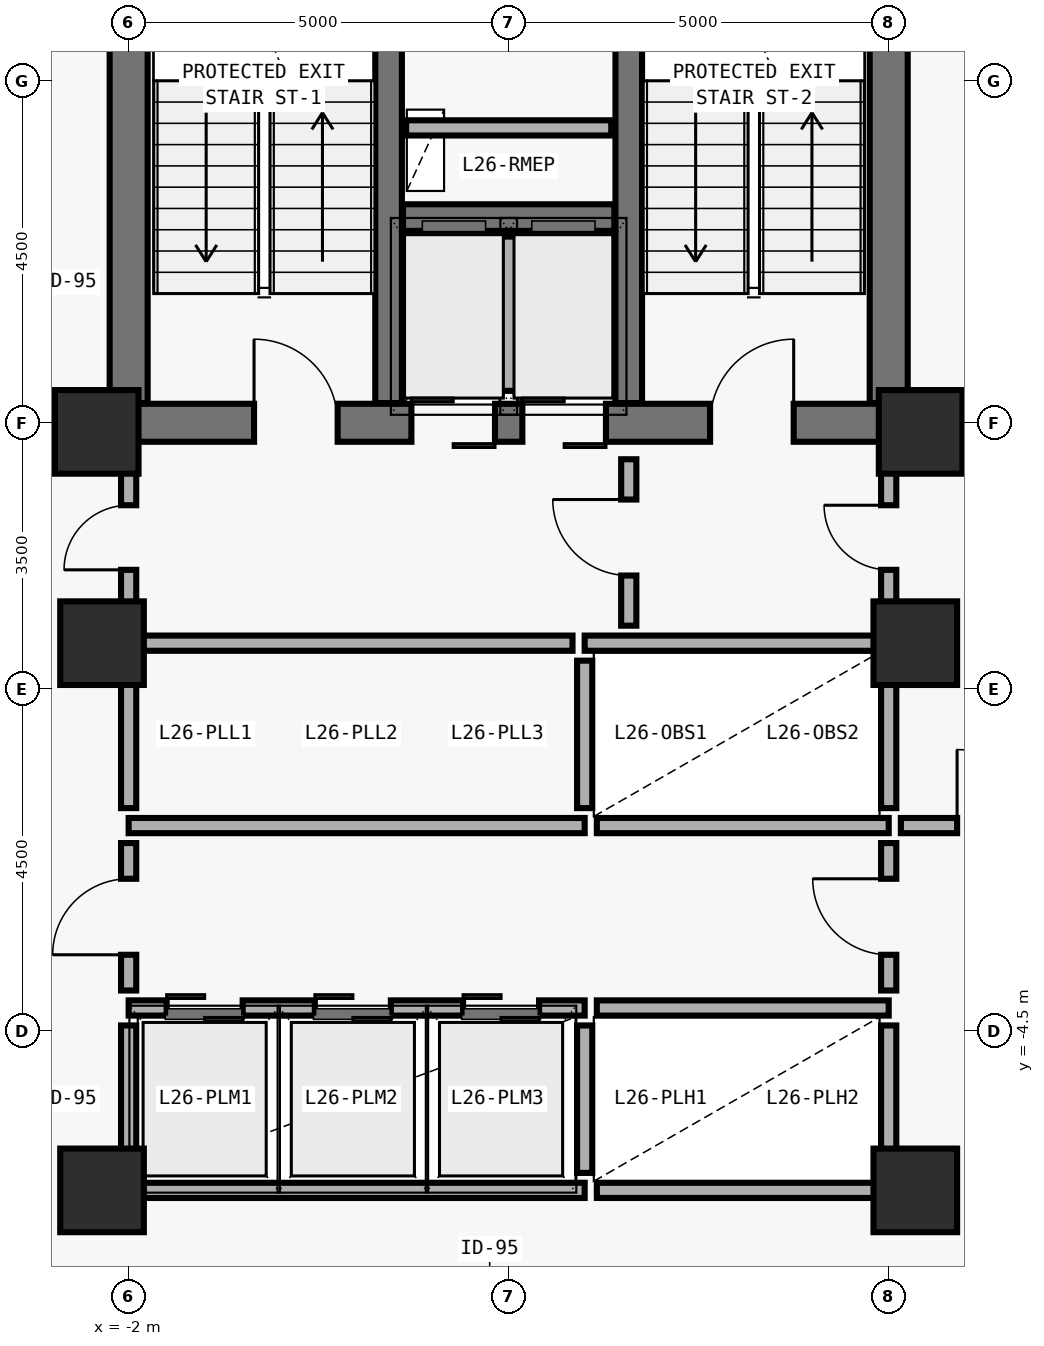
"""IFC4 building model, lengths in metres.
Left out: names, types, materials, properties, quantities, classifications, styles, units other than length and angle.
Written with IfcOpenShell. Run it as: python <this file> out.ifc"""

import sys

from ifc_helpers import new_model, si_unit, direction, frame, frame_2d, origin, origin_2d, place, context, subcontext, project, spatial, rectangle, extrude, element, fill, save


model = new_model("IFC4")
c1 = context("Model", 3, precision=1e-05, world=origin(), true_north=direction((0.0, 1.0)))
c2 = subcontext(c1, "Body", "Model", "MODEL_VIEW")
j1 = project(units=[si_unit("LENGTHUNIT", "METRE"), si_unit("PLANEANGLEUNIT", "RADIAN")], contexts=[c1])
p1 = place(None, origin())
s1 = spatial("IfcSite", under=j1, at=p1, CompositionType="ELEMENT")
p2 = place(p1, origin())
s2 = spatial("IfcBuilding", under=s1, at=p2, CompositionType="ELEMENT")
p3 = place(p2, frame((0.0, 0.0, 107.1)))
s3 = spatial("IfcBuildingStorey", under=s2, at=p3, CompositionType="ELEMENT", Elevation=107.1)
p4 = place(p3, frame((-2.0, 3.5, 0.0), z_axis=(0.0, 0.0, 1.0), x_axis=(1.0, 0.0, 0.0)))
e1 = element("IfcWall", 1, at=p4, inside=s3, PredefinedType="SHEAR", context=c2, shape_type="SweptSolid", body=[
    extrude(rectangle(XDim=10.0, YDim=0.5, at=frame_2d((5.0, 0.0))), origin(), (0.0, 0.0, 1.0), 3.892),
])
p5 = place(p4, frame((1.65, 0.0, 0.0)))
e2 = element("IfcOpeningElement", 2, at=p5, cuts=e1, PredefinedType="OPENING", context=c2, shape_type="SweptSolid", body=[
    extrude(rectangle(XDim=1.1, YDim=2.15, at=frame_2d((0.55, 1.075))), frame((0.0, 0.26, 0.0), z_axis=(0.0, -1.0, 0.0), x_axis=(1.0, 0.0, 0.0)), (0.0, 0.0, 1.0), 0.52),
])
p6 = place(p4, frame((7.65, 0.0, 0.0)))
e3 = element("IfcOpeningElement", 3, at=p6, cuts=e1, PredefinedType="OPENING", context=c2, shape_type="SweptSolid", body=[
    extrude(rectangle(XDim=1.1, YDim=2.15, at=frame_2d((0.55, 1.075))), frame((0.0, 0.26, 0.0), z_axis=(0.0, -1.0, 0.0), x_axis=(1.0, 0.0, 0.0)), (0.0, 0.0, 1.0), 0.52),
])
p7 = place(p4, frame((3.72, 0.0, 0.0)))
e4 = element("IfcOpeningElement", 4, at=p7, cuts=e1, PredefinedType="OPENING", context=c2, shape_type="SweptSolid", body=[
    extrude(rectangle(XDim=1.1, YDim=2.2, at=frame_2d((0.55, 1.1))), frame((0.0, 0.26, 0.0), z_axis=(0.0, -1.0, 0.0), x_axis=(1.0, 0.0, 0.0)), (0.0, 0.0, 1.0), 0.52),
])
p8 = place(p4, frame((5.18, 0.0, 0.0)))
e5 = element("IfcOpeningElement", 5, at=p8, cuts=e1, PredefinedType="OPENING", context=c2, shape_type="SweptSolid", body=[
    extrude(rectangle(XDim=1.1, YDim=2.2, at=frame_2d((0.55, 1.1))), frame((0.0, 0.26, 0.0), z_axis=(0.0, -1.0, 0.0), x_axis=(1.0, 0.0, 0.0)), (0.0, 0.0, 1.0), 0.52),
])
for number, where, z_axis, x_axis in (
    (6, (-2.0, 3.76, 0.0), (0.0, 0.0, 1.0), (0.0, 1.0, 0.0)),
    (7, (8.0, 3.76, 0.0), (0.0, 0.0, 1.0), (0.0, 1.0, 0.0)),
):
    element("IfcWall", number, at=place(p3, frame(where, z_axis=z_axis, x_axis=x_axis)), inside=s3, PredefinedType="SHEAR", context=c2, shape_type="SweptSolid", body=[
        extrude(rectangle(XDim=8.48, YDim=0.5, at=frame_2d((4.24, 0.0))), origin(), (0.0, 0.0, 1.0), 3.892),
    ])
for number, where, z_axis, x_axis in (
    (8, (1.42, 3.76, 0.0), (0.0, 0.0, 1.0), (0.0, 1.0, 0.0)),
    (9, (4.58, 3.76, 0.0), (0.0, 0.0, 1.0), (0.0, 1.0, 0.0)),
):
    element("IfcWall", number, at=place(p3, frame(where, z_axis=z_axis, x_axis=x_axis)), inside=s3, PredefinedType="SHEAR", context=c2, shape_type="SweptSolid", body=[
        extrude(rectangle(XDim=8.48, YDim=0.35, at=frame_2d((4.24, 0.0))), origin(), (0.0, 0.0, 1.0), 3.892),
    ])
p9 = place(p3, frame((1.61, 6.2, 0.0), z_axis=(0.0, 0.0, 1.0), x_axis=(1.0, 0.0, 0.0)))
e10 = element("IfcWall", 10, at=p9, inside=s3, PredefinedType="SHEAR", context=c2, shape_type="SweptSolid", body=[
    extrude(rectangle(XDim=2.78, YDim=0.35, at=frame_2d((1.39, 0.0))), origin(), (0.0, 0.0, 1.0), 3.892),
])
for number, where, z_axis, x_axis in (
    (11, (-2.42, 3.38, 0.0), (0.0, 0.0, 1.0), (1.0, 0.0, 0.0)),
    (12, (8.42, 3.38, 0.0), (0.0, 0.0, 1.0), (1.0, 0.0, 0.0)),
    (13, (-2.35, 0.6, 0.0), (0.0, 0.0, 1.0), (1.0, 0.0, 0.0)),
    (14, (8.35, 0.6, 0.0), (0.0, 0.0, 1.0), (1.0, 0.0, 0.0)),
    (15, (-2.35, -6.6, 0.0), (0.0, 0.0, 1.0), (1.0, 0.0, 0.0)),
    (16, (8.35, -6.6, 0.0), (0.0, 0.0, 1.0), (1.0, 0.0, 0.0)),
):
    element("IfcColumn", number, at=place(p3, frame(where, z_axis=z_axis, x_axis=x_axis)), inside=s3, PredefinedType="COLUMN", context=c2, shape_type="SweptSolid", body=[
        extrude(rectangle(XDim=1.1, YDim=1.1, at=origin_2d()), origin(), (0.0, 0.0, 1.0), 3.875),
    ])
p10 = place(p3, frame((3.0, 3.92, 0.0), z_axis=(0.0, 0.0, 1.0), x_axis=(0.0, 1.0, 0.0)))
e17 = element("IfcWall", 17, at=p10, inside=s3, PredefinedType="SOLIDWALL", context=c2, shape_type="SweptSolid", body=[
    extrude(rectangle(XDim=2.03, YDim=0.2, at=frame_2d((1.015, 0.0))), origin(), (0.0, 0.0, 1.0), 3.64),
])
p11 = place(p3, frame((1.65, 7.38, 0.0), z_axis=(0.0, 0.0, 1.0), x_axis=(1.0, 0.0, 0.0)))
e18 = element("IfcWall", 18, at=p11, inside=s3, PredefinedType="SOLIDWALL", context=c2, shape_type="SweptSolid", body=[
    extrude(rectangle(XDim=2.7, YDim=0.2, at=frame_2d((1.35, 0.0))), origin(), (0.0, 0.0, 1.0), 3.64),
])
p12 = place(p3, frame((4.0, 0.6, 0.0), z_axis=(0.0, 0.0, 1.0), x_axis=(1.0, 0.0, 0.0)))
e19 = element("IfcWall", 19, at=p12, inside=s3, PredefinedType="SOLIDWALL", context=c2, shape_type="SweptSolid", body=[
    extrude(rectangle(XDim=3.88, YDim=0.2, at=frame_2d((1.94, 0.0))), origin(), (0.0, 0.0, 1.0), 3.172),
])
p13 = place(p3, frame((-2.0, -1.8, 0.0), z_axis=(0.0, 0.0, 1.0), x_axis=(1.0, 0.0, 0.0)))
e20 = element("IfcWall", 20, at=p13, inside=s3, PredefinedType="SOLIDWALL", context=c2, shape_type="SweptSolid", body=[
    extrude(rectangle(XDim=6.0, YDim=0.2, at=frame_2d((3.0, 0.0))), origin(), (0.0, 0.0, 1.0), 3.64),
])
p14 = place(p3, frame((-2.0, -1.57, 0.0), z_axis=(0.0, 0.0, 1.0), x_axis=(0.0, 1.0, 0.0)))
e21 = element("IfcWall", 21, at=p14, inside=s3, PredefinedType="SOLIDWALL", context=c2, shape_type="SweptSolid", body=[
    extrude(rectangle(XDim=2.05, YDim=0.2, at=frame_2d((1.025, 0.0))), origin(), (0.0, 0.0, 1.0), 3.022),
])
p15 = place(p3, frame((4.16, -1.8, 0.0), z_axis=(0.0, 0.0, 1.0), x_axis=(1.0, 0.0, 0.0)))
e22 = element("IfcWall", 22, at=p15, inside=s3, PredefinedType="SOLIDWALL", context=c2, shape_type="SweptSolid", body=[
    extrude(rectangle(XDim=3.84, YDim=0.2, at=frame_2d((1.92, 0.0))), origin(), (0.0, 0.0, 1.0), 3.64),
])
p16 = place(p3, frame((4.0, -1.57, 0.0), z_axis=(0.0, 0.0, 1.0), x_axis=(0.0, 1.0, 0.0)))
e23 = element("IfcWall", 23, at=p16, inside=s3, PredefinedType="SOLIDWALL", context=c2, shape_type="SweptSolid", body=[
    extrude(rectangle(XDim=1.94, YDim=0.2, at=frame_2d((0.97, 0.0))), origin(), (0.0, 0.0, 1.0), 3.64),
])
p17 = place(p3, frame((8.0, -1.57, 0.0), z_axis=(0.0, 0.0, 1.0), x_axis=(0.0, 1.0, 0.0)))
e24 = element("IfcWall", 24, at=p17, inside=s3, PredefinedType="SOLIDWALL", context=c2, shape_type="SweptSolid", body=[
    extrude(rectangle(XDim=2.05, YDim=0.2, at=frame_2d((1.025, 0.0))), origin(), (0.0, 0.0, 1.0), 3.072),
])
p18 = place(p3, frame((-2.0, -4.2, 0.0), z_axis=(0.0, 0.0, 1.0), x_axis=(1.0, 0.0, 0.0)))
e25 = element("IfcWall", 25, at=p18, inside=s3, PredefinedType="SOLIDWALL", context=c2, shape_type="SweptSolid", body=[
    extrude(rectangle(XDim=6.0, YDim=0.2, at=frame_2d((3.0, 0.0))), origin(), (0.0, 0.0, 1.0), 3.64),
])
p19 = place(p18, frame((0.5, 0.0, 0.0)))
e26 = element("IfcOpeningElement", 26, at=p19, cuts=e25, PredefinedType="OPENING", context=c2, shape_type="SweptSolid", body=[
    extrude(rectangle(XDim=1.0, YDim=2.2, at=frame_2d((0.5, 1.1))), frame((0.0, 0.11, 0.0), z_axis=(0.0, -1.0, 0.0), x_axis=(1.0, 0.0, 0.0)), (0.0, 0.0, 1.0), 0.22),
])
p20 = place(p18, frame((2.45, 0.0, 0.0)))
e27 = element("IfcOpeningElement", 27, at=p20, cuts=e25, PredefinedType="OPENING", context=c2, shape_type="SweptSolid", body=[
    extrude(rectangle(XDim=1.0, YDim=2.2, at=frame_2d((0.5, 1.1))), frame((0.0, 0.11, 0.0), z_axis=(0.0, -1.0, 0.0), x_axis=(1.0, 0.0, 0.0)), (0.0, 0.0, 1.0), 0.22),
])
p21 = place(p18, frame((4.4, 0.0, 0.0)))
e28 = element("IfcOpeningElement", 28, at=p21, cuts=e25, PredefinedType="OPENING", context=c2, shape_type="SweptSolid", body=[
    extrude(rectangle(XDim=1.0, YDim=2.2, at=frame_2d((0.5, 1.1))), frame((0.0, 0.11, 0.0), z_axis=(0.0, -1.0, 0.0), x_axis=(1.0, 0.0, 0.0)), (0.0, 0.0, 1.0), 0.22),
])
p22 = place(p3, frame((-2.0, -6.6, 0.0), z_axis=(0.0, 0.0, 1.0), x_axis=(1.0, 0.0, 0.0)))
e29 = element("IfcWall", 29, at=p22, inside=s3, PredefinedType="SOLIDWALL", context=c2, shape_type="SweptSolid", body=[
    extrude(rectangle(XDim=6.0, YDim=0.2, at=frame_2d((3.0, 0.0))), origin(), (0.0, 0.0, 1.0), 3.172),
])
p23 = place(p3, frame((-2.0, -6.37, 0.0), z_axis=(0.0, 0.0, 1.0), x_axis=(0.0, 1.0, 0.0)))
e30 = element("IfcWall", 30, at=p23, inside=s3, PredefinedType="SOLIDWALL", context=c2, shape_type="SweptSolid", body=[
    extrude(rectangle(XDim=1.94, YDim=0.2, at=frame_2d((0.97, 0.0))), origin(), (0.0, 0.0, 1.0), 3.022),
])
p24 = place(p3, frame((4.16, -4.2, 0.0), z_axis=(0.0, 0.0, 1.0), x_axis=(1.0, 0.0, 0.0)))
e31 = element("IfcWall", 31, at=p24, inside=s3, PredefinedType="SOLIDWALL", context=c2, shape_type="SweptSolid", body=[
    extrude(rectangle(XDim=3.84, YDim=0.2, at=frame_2d((1.92, 0.0))), origin(), (0.0, 0.0, 1.0), 3.64),
])
p25 = place(p3, frame((4.16, -6.6, 0.0), z_axis=(0.0, 0.0, 1.0), x_axis=(1.0, 0.0, 0.0)))
e32 = element("IfcWall", 32, at=p25, inside=s3, PredefinedType="SOLIDWALL", context=c2, shape_type="SweptSolid", body=[
    extrude(rectangle(XDim=3.84, YDim=0.2, at=frame_2d((1.92, 0.0))), origin(), (0.0, 0.0, 1.0), 3.172),
])
p26 = place(p3, frame((4.0, -6.37, 0.0), z_axis=(0.0, 0.0, 1.0), x_axis=(0.0, 1.0, 0.0)))
e33 = element("IfcWall", 33, at=p26, inside=s3, PredefinedType="SOLIDWALL", context=c2, shape_type="SweptSolid", body=[
    extrude(rectangle(XDim=1.94, YDim=0.2, at=frame_2d((0.97, 0.0))), origin(), (0.0, 0.0, 1.0), 3.64),
])
p27 = place(p3, frame((8.0, -6.37, 0.0), z_axis=(0.0, 0.0, 1.0), x_axis=(0.0, 1.0, 0.0)))
e34 = element("IfcWall", 34, at=p27, inside=s3, PredefinedType="SOLIDWALL", context=c2, shape_type="SweptSolid", body=[
    extrude(rectangle(XDim=1.94, YDim=0.2, at=frame_2d((0.97, 0.0))), origin(), (0.0, 0.0, 1.0), 3.072),
])
p28 = place(p3, frame((4.58, 0.83, 0.0), z_axis=(0.0, 0.0, 1.0), x_axis=(0.0, 1.0, 0.0)))
e35 = element("IfcWall", 35, at=p28, inside=s3, PredefinedType="MOVABLE", context=c2, shape_type="SweptSolid", body=[
    extrude(rectangle(XDim=2.19, YDim=0.2, at=frame_2d((1.095, 0.0))), origin(), (0.0, 0.0, 1.0), 3.64),
])
p29 = place(p28, frame((0.66, 0.0, 0.0)))
e36 = element("IfcOpeningElement", 36, at=p29, cuts=e35, PredefinedType="OPENING", context=c2, shape_type="SweptSolid", body=[
    extrude(rectangle(XDim=1.0, YDim=2.1, at=frame_2d((0.5, 1.05))), frame((0.0, 0.11, 0.0), z_axis=(0.0, -1.0, 0.0), x_axis=(1.0, 0.0, 0.0)), (0.0, 0.0, 1.0), 0.22),
])
p30 = place(p3, frame((-2.0, 0.72, 0.0), z_axis=(0.0, 0.0, 1.0), x_axis=(0.0, 1.0, 0.0)))
e37 = element("IfcWall", 37, at=p30, inside=s3, PredefinedType="MOVABLE", context=c2, shape_type="SweptSolid", body=[
    extrude(rectangle(XDim=2.3, YDim=0.2, at=frame_2d((1.15, 0.0))), origin(), (0.0, 0.0, 1.0), 2.872),
])
p31 = place(p30, frame((0.845, 0.0, 0.0)))
e38 = element("IfcOpeningElement", 38, at=p31, cuts=e37, PredefinedType="OPENING", context=c2, shape_type="SweptSolid", body=[
    extrude(rectangle(XDim=0.85, YDim=2.1, at=frame_2d((0.425, 1.05))), frame((0.0, 0.11, 0.0), z_axis=(0.0, -1.0, 0.0), x_axis=(1.0, 0.0, 0.0)), (0.0, 0.0, 1.0), 0.22),
])
p32 = place(p3, frame((8.0, 0.72, 0.0), z_axis=(0.0, 0.0, 1.0), x_axis=(0.0, 1.0, 0.0)))
e39 = element("IfcWall", 39, at=p32, inside=s3, PredefinedType="MOVABLE", context=c2, shape_type="SweptSolid", body=[
    extrude(rectangle(XDim=2.3, YDim=0.2, at=frame_2d((1.15, 0.0))), origin(), (0.0, 0.0, 1.0), 2.872),
])
p33 = place(p32, frame((0.845, 0.0, 0.0)))
e40 = element("IfcOpeningElement", 40, at=p33, cuts=e39, PredefinedType="OPENING", context=c2, shape_type="SweptSolid", body=[
    extrude(rectangle(XDim=0.85, YDim=2.1, at=frame_2d((0.425, 1.05))), frame((0.0, 0.11, 0.0), z_axis=(0.0, -1.0, 0.0), x_axis=(1.0, 0.0, 0.0)), (0.0, 0.0, 1.0), 0.22),
])
p34 = place(p3, frame((-2.0, -3.97, 0.0), z_axis=(0.0, 0.0, 1.0), x_axis=(0.0, 1.0, 0.0)))
e41 = element("IfcWall", 41, at=p34, inside=s3, PredefinedType="MOVABLE", context=c2, shape_type="SweptSolid", body=[
    extrude(rectangle(XDim=1.94, YDim=0.2, at=frame_2d((0.97, 0.0))), origin(), (0.0, 0.0, 1.0), 3.022),
])
p35 = place(p34, frame((0.47, 0.0, 0.0)))
e42 = element("IfcOpeningElement", 42, at=p35, cuts=e41, PredefinedType="OPENING", context=c2, shape_type="SweptSolid", body=[
    extrude(rectangle(XDim=1.0, YDim=2.1, at=frame_2d((0.5, 1.05))), frame((0.0, 0.11, 0.0), z_axis=(0.0, -1.0, 0.0), x_axis=(1.0, 0.0, 0.0)), (0.0, 0.0, 1.0), 0.22),
])
p36 = place(p3, frame((8.0, -3.97, 0.0), z_axis=(0.0, 0.0, 1.0), x_axis=(0.0, 1.0, 0.0)))
e43 = element("IfcWall", 43, at=p36, inside=s3, PredefinedType="MOVABLE", context=c2, shape_type="SweptSolid", body=[
    extrude(rectangle(XDim=1.94, YDim=0.2, at=frame_2d((0.97, 0.0))), origin(), (0.0, 0.0, 1.0), 3.072),
])
p37 = place(p36, frame((0.47, 0.0, 0.0)))
e44 = element("IfcOpeningElement", 44, at=p37, cuts=e43, PredefinedType="OPENING", context=c2, shape_type="SweptSolid", body=[
    extrude(rectangle(XDim=1.0, YDim=2.1, at=frame_2d((0.5, 1.05))), frame((0.0, 0.11, 0.0), z_axis=(0.0, -1.0, 0.0), x_axis=(1.0, 0.0, 0.0)), (0.0, 0.0, 1.0), 0.22),
])
p38 = place(p3, frame((8.16, -1.8, 0.0), z_axis=(0.0, 0.0, 1.0), x_axis=(1.0, 0.0, 0.0)))
e45 = element("IfcWall", 45, at=p38, inside=s3, PredefinedType="MOVABLE", context=c2, shape_type="SweptSolid", body=[
    extrude(rectangle(XDim=2.64, YDim=0.2, at=frame_2d((1.32, 0.0))), origin(), (0.0, 0.0, 1.0), 3.64),
])
p39 = place(p38, frame((0.74, 0.0, 0.0)))
e46 = element("IfcOpeningElement", 46, at=p39, cuts=e45, PredefinedType="OPENING", context=c2, shape_type="SweptSolid", body=[
    extrude(rectangle(XDim=1.0, YDim=2.1, at=frame_2d((0.5, 1.05))), frame((0.0, 0.11, 0.0), z_axis=(0.0, -1.0, 0.0), x_axis=(1.0, 0.0, 0.0)), (0.0, 0.0, 1.0), 0.22),
])
p40 = place(p3, frame((-1.88, 0.6, 0.0), z_axis=(0.0, 0.0, 1.0), x_axis=(1.0, 0.0, 0.0)))
e47 = element("IfcWall", 47, at=p40, inside=s3, PredefinedType="MOVABLE", context=c2, shape_type="SweptSolid", body=[
    extrude(rectangle(XDim=5.72, YDim=0.2, at=frame_2d((2.86, 0.0))), origin(), (0.0, 0.0, 1.0), 3.172),
])
p41 = place(p5, origin())
e48 = element("IfcDoor", 48, at=p41, inside=s3, OperationType="SINGLE_SWING_LEFT", PredefinedType="DOOR", context=c2, shape_type="SweptSolid", body=[
    extrude(rectangle(XDim=1.1, YDim=2.15, at=frame_2d((0.55, 1.075))), frame((0.0, 0.025, 0.0), z_axis=(0.0, -1.0, 0.0), x_axis=(1.0, 0.0, 0.0)), (0.0, 0.0, 1.0), 0.05),
])
fill(e2, e48)
p42 = place(p6, origin())
e49 = element("IfcDoor", 49, at=p42, inside=s3, OperationType="SINGLE_SWING_RIGHT", PredefinedType="DOOR", context=c2, shape_type="SweptSolid", body=[
    extrude(rectangle(XDim=1.1, YDim=2.15, at=frame_2d((0.55, 1.075))), frame((0.0, 0.025, 0.0), z_axis=(0.0, -1.0, 0.0), x_axis=(1.0, 0.0, 0.0)), (0.0, 0.0, 1.0), 0.05),
])
fill(e3, e49)
p43 = place(p7, origin())
e50 = element("IfcDoor", 50, at=p43, inside=s3, OperationType="DOUBLE_DOOR_SLIDING", PredefinedType="DOOR", context=c2, shape_type="SweptSolid", body=[
    extrude(rectangle(XDim=1.1, YDim=2.2, at=frame_2d((0.55, 1.1))), frame((0.0, 0.025, 0.0), z_axis=(0.0, -1.0, 0.0), x_axis=(1.0, 0.0, 0.0)), (0.0, 0.0, 1.0), 0.05),
])
fill(e4, e50)
p44 = place(p8, origin())
e51 = element("IfcDoor", 51, at=p44, inside=s3, OperationType="DOUBLE_DOOR_SLIDING", PredefinedType="DOOR", context=c2, shape_type="SweptSolid", body=[
    extrude(rectangle(XDim=1.1, YDim=2.2, at=frame_2d((0.55, 1.1))), frame((0.0, 0.025, 0.0), z_axis=(0.0, -1.0, 0.0), x_axis=(1.0, 0.0, 0.0)), (0.0, 0.0, 1.0), 0.05),
])
fill(e5, e51)
p45 = place(p29, origin())
e52 = element("IfcDoor", 52, at=p45, inside=s3, OperationType="SINGLE_SWING_RIGHT", PredefinedType="DOOR", context=c2, shape_type="SweptSolid", body=[
    extrude(rectangle(XDim=1.0, YDim=2.1, at=frame_2d((0.5, 1.05))), frame((0.0, 0.025, 0.0), z_axis=(0.0, -1.0, 0.0), x_axis=(1.0, 0.0, 0.0)), (0.0, 0.0, 1.0), 0.05),
])
fill(e36, e52)
p46 = place(p31, origin())
e53 = element("IfcDoor", 53, at=p46, inside=s3, OperationType="SINGLE_SWING_LEFT", PredefinedType="DOOR", context=c2, shape_type="SweptSolid", body=[
    extrude(rectangle(XDim=0.85, YDim=2.1, at=frame_2d((0.425, 1.05))), frame((0.0, 0.025, 0.0), z_axis=(0.0, -1.0, 0.0), x_axis=(1.0, 0.0, 0.0)), (0.0, 0.0, 1.0), 0.05),
])
fill(e38, e53)
p47 = place(p33, origin())
e54 = element("IfcDoor", 54, at=p47, inside=s3, OperationType="SINGLE_SWING_RIGHT", PredefinedType="DOOR", context=c2, shape_type="SweptSolid", body=[
    extrude(rectangle(XDim=0.85, YDim=2.1, at=frame_2d((0.425, 1.05))), frame((0.0, 0.025, 0.0), z_axis=(0.0, -1.0, 0.0), x_axis=(1.0, 0.0, 0.0)), (0.0, 0.0, 1.0), 0.05),
])
fill(e40, e54)
p48 = place(p35, origin())
e55 = element("IfcDoor", 55, at=p48, inside=s3, OperationType="SINGLE_SWING_LEFT", PredefinedType="DOOR", context=c2, shape_type="SweptSolid", body=[
    extrude(rectangle(XDim=1.0, YDim=2.1, at=frame_2d((0.5, 1.05))), frame((0.0, 0.025, 0.0), z_axis=(0.0, -1.0, 0.0), x_axis=(1.0, 0.0, 0.0)), (0.0, 0.0, 1.0), 0.05),
])
fill(e42, e55)
p49 = place(p37, origin())
e56 = element("IfcDoor", 56, at=p49, inside=s3, OperationType="SINGLE_SWING_RIGHT", PredefinedType="DOOR", context=c2, shape_type="SweptSolid", body=[
    extrude(rectangle(XDim=1.0, YDim=2.1, at=frame_2d((0.5, 1.05))), frame((0.0, 0.025, 0.0), z_axis=(0.0, -1.0, 0.0), x_axis=(1.0, 0.0, 0.0)), (0.0, 0.0, 1.0), 0.05),
])
fill(e44, e56)
p50 = place(p39, origin())
e57 = element("IfcDoor", 57, at=p50, inside=s3, OperationType="SINGLE_SWING_LEFT", PredefinedType="DOOR", context=c2, shape_type="SweptSolid", body=[
    extrude(rectangle(XDim=1.0, YDim=2.1, at=frame_2d((0.5, 1.05))), frame((0.0, 0.025, 0.0), z_axis=(0.0, -1.0, 0.0), x_axis=(1.0, 0.0, 0.0)), (0.0, 0.0, 1.0), 0.05),
])
fill(e46, e57)
p51 = place(p19, origin())
e58 = element("IfcDoor", 58, at=p51, inside=s3, OperationType="DOUBLE_DOOR_SLIDING", PredefinedType="DOOR", context=c2, shape_type="SweptSolid", body=[
    extrude(rectangle(XDim=1.0, YDim=2.2, at=frame_2d((0.5, 1.1))), frame((0.0, 0.025, 0.0), z_axis=(0.0, -1.0, 0.0), x_axis=(1.0, 0.0, 0.0)), (0.0, 0.0, 1.0), 0.05),
])
fill(e26, e58)
p52 = place(p20, origin())
e59 = element("IfcDoor", 59, at=p52, inside=s3, OperationType="DOUBLE_DOOR_SLIDING", PredefinedType="DOOR", context=c2, shape_type="SweptSolid", body=[
    extrude(rectangle(XDim=1.0, YDim=2.2, at=frame_2d((0.5, 1.1))), frame((0.0, 0.025, 0.0), z_axis=(0.0, -1.0, 0.0), x_axis=(1.0, 0.0, 0.0)), (0.0, 0.0, 1.0), 0.05),
])
fill(e27, e59)
p53 = place(p21, origin())
e60 = element("IfcDoor", 60, at=p53, inside=s3, OperationType="DOUBLE_DOOR_SLIDING", PredefinedType="DOOR", context=c2, shape_type="SweptSolid", body=[
    extrude(rectangle(XDim=1.0, YDim=2.2, at=frame_2d((0.5, 1.1))), frame((0.0, 0.025, 0.0), z_axis=(0.0, -1.0, 0.0), x_axis=(1.0, 0.0, 0.0)), (0.0, 0.0, 1.0), 0.05),
])
fill(e28, e60)
save(model, sys.argv[1])
